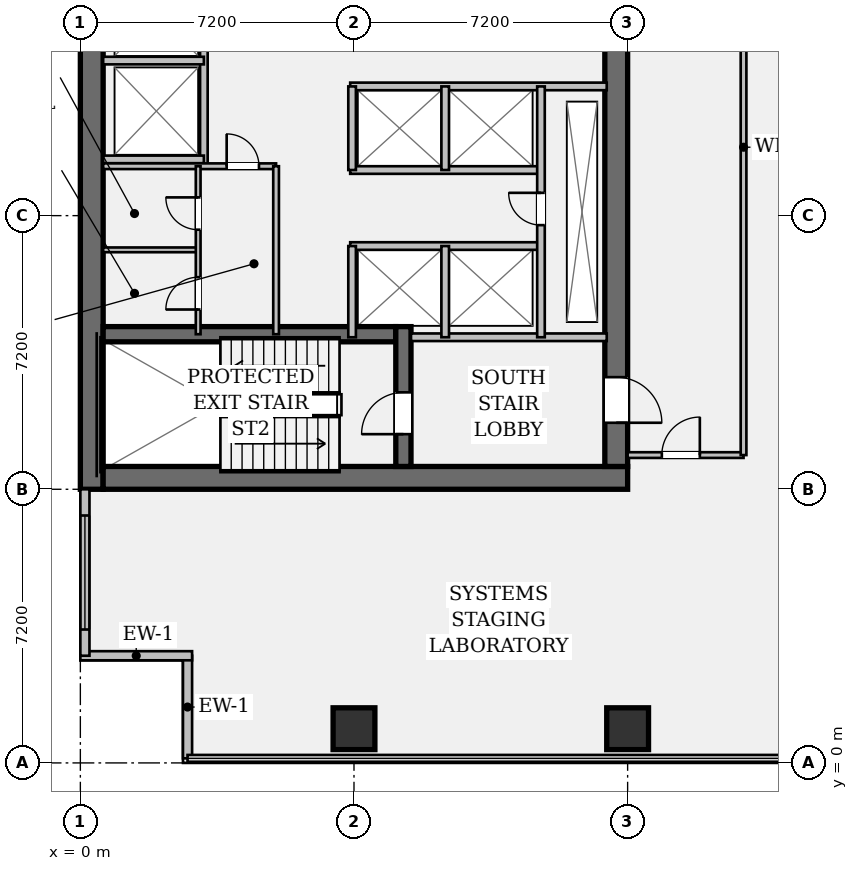
"""IFC4 building model, lengths in metres.
Left out: names, types, materials, properties, quantities, classifications, styles, units other than length and angle.
Written with IfcOpenShell. Run it as: python <this file> out.ifc"""

import sys

from ifc_helpers import new_model, si_unit, direction, frame, frame_2d, origin, origin_2d, place, context, subcontext, project, spatial, rectangle, hollow_rectangle, extrude, element, fill, save


model = new_model("IFC4")
c1 = context("Model", 3, precision=1e-05, world=origin(), true_north=direction((0.0, 1.0)))
c2 = subcontext(c1, "Body", "Model", "MODEL_VIEW")
j1 = project(units=[si_unit("LENGTHUNIT", "METRE"), si_unit("PLANEANGLEUNIT", "RADIAN")], contexts=[c1])
p1 = place(None, origin())
s1 = spatial("IfcSite", under=j1, at=p1, CompositionType="ELEMENT")
p2 = place(p1, origin())
s2 = spatial("IfcBuilding", under=s1, at=p2, CompositionType="ELEMENT")
p3 = place(p2, frame((0.0, 0.0, 22.05)))
s3 = spatial("IfcBuildingStorey", under=s2, at=p3, CompositionType="ELEMENT", Elevation=22.05)
p4 = place(p3, frame((0.3, 7.2, 0.0), z_axis=(0.0, 0.0, 1.0), x_axis=(0.0, 1.0, 0.0)))
e1 = element("IfcWall", 1, at=p4, inside=s3, PredefinedType="SHEAR", context=c2, shape_type="SweptSolid", body=[
    extrude(rectangle(XDim=28.8, YDim=0.6, at=frame_2d((14.4, 0.0))), origin(), (0.0, 0.0, 1.0), 3.9),
])
p5 = place(p3, frame((0.6, 7.5, 0.0), z_axis=(0.0, 0.0, 1.0), x_axis=(1.0, 0.0, 0.0)))
e2 = element("IfcWall", 2, at=p5, inside=s3, PredefinedType="SHEAR", context=c2, shape_type="SweptSolid", body=[
    extrude(rectangle(XDim=13.8, YDim=0.6, at=frame_2d((6.9, 0.0))), origin(), (0.0, 0.0, 1.0), 3.9),
])
p6 = place(p3, frame((14.1, 35.4, 0.0), z_axis=(0.0, 0.0, 1.0), x_axis=(0.0, -1.0, 0.0)))
e3 = element("IfcWall", 3, at=p6, inside=s3, PredefinedType="SHEAR", context=c2, shape_type="SweptSolid", body=[
    extrude(rectangle(XDim=27.6, YDim=0.6, at=frame_2d((13.8, 0.0))), origin(), (0.0, 0.0, 1.0), 3.9),
])
p7 = place(p6, frame((1.3, 0.0, 0.0)))
e4 = element("IfcOpeningElement", 4, at=p7, cuts=e3, PredefinedType="OPENING", context=c2, shape_type="SweptSolid", body=[
    extrude(rectangle(XDim=1.2, YDim=2.15, at=frame_2d((0.6, 1.075))), frame((0.0, 0.312, 0.0), z_axis=(0.0, -1.0, 0.0), x_axis=(1.0, 0.0, 0.0)), (0.0, 0.0, 1.0), 0.624),
])
p8 = place(p6, frame((25.25, 0.0, 0.0)))
e5 = element("IfcOpeningElement", 5, at=p8, cuts=e3, PredefinedType="OPENING", context=c2, shape_type="SweptSolid", body=[
    extrude(rectangle(XDim=1.2, YDim=2.15, at=frame_2d((0.6, 1.075))), frame((0.0, 0.312, 0.0), z_axis=(0.0, -1.0, 0.0), x_axis=(1.0, 0.0, 0.0)), (0.0, 0.0, 1.0), 0.624),
])
p9 = place(p6, frame((14.6, 0.0, 0.0)))
e6 = element("IfcOpeningElement", 6, at=p9, cuts=e3, PredefinedType="OPENING", context=c2, shape_type="SweptSolid", body=[
    extrude(rectangle(XDim=1.6, YDim=2.2, at=frame_2d((0.8, 1.1))), frame((0.0, 0.312, 0.0), z_axis=(0.0, -1.0, 0.0), x_axis=(1.0, 0.0, 0.0)), (0.0, 0.0, 1.0), 0.624),
])
p10 = place(p3, frame((0.6, 11.28, 0.0), z_axis=(0.0, 0.0, 1.0), x_axis=(1.0, 0.0, 0.0)))
e7 = element("IfcWall", 7, at=p10, inside=s3, PredefinedType="SHEAR", context=c2, shape_type="SweptSolid", body=[
    extrude(rectangle(XDim=7.7, YDim=0.4, at=frame_2d((3.85, 0.0))), origin(), (0.0, 0.0, 1.0), 3.9),
])
p11 = place(p3, frame((8.5, 7.8, 0.0), z_axis=(0.0, 0.0, 1.0), x_axis=(0.0, 1.0, 0.0)))
e8 = element("IfcWall", 8, at=p11, inside=s3, PredefinedType="SHEAR", context=c2, shape_type="SweptSolid", body=[
    extrude(rectangle(XDim=3.68, YDim=0.4, at=frame_2d((1.84, 0.0))), origin(), (0.0, 0.0, 1.0), 3.9),
])
p12 = place(p11, frame((0.85, 0.0, 0.0)))
e9 = element("IfcOpeningElement", 9, at=p12, cuts=e8, PredefinedType="OPENING", context=c2, shape_type="SweptSolid", body=[
    extrude(rectangle(XDim=1.1, YDim=2.15, at=frame_2d((0.55, 1.075))), frame((0.0, 0.212, 0.0), z_axis=(0.0, -1.0, 0.0), x_axis=(1.0, 0.0, 0.0)), (0.0, 0.0, 1.0), 0.424),
])
for number, where, z_axis, x_axis in (
    (10, (7.2, 0.9, 0.0), (0.0, 0.0, 1.0), (1.0, 0.0, 0.0)),
    (11, (14.4, 0.9, 0.0), (0.0, 0.0, 1.0), (1.0, 0.0, 0.0)),
):
    element("IfcColumn", number, at=place(p3, frame(where, z_axis=z_axis, x_axis=x_axis)), inside=s3, PredefinedType="COLUMN", context=c2, shape_type="SweptSolid", body=[
        extrude(hollow_rectangle(XDim=1.1, YDim=1.1, WallThickness=0.07, at=origin_2d()), origin(), (0.0, 0.0, 1.0), 3.9),
    ])
p13 = place(p3, frame((2.82, 0.12, 0.0), z_axis=(0.0, 0.0, 1.0), x_axis=(0.0, 1.0, 0.0)))
e12 = element("IfcWall", 12, at=p13, inside=s3, PredefinedType="STANDARD", context=c2, shape_type="SweptSolid", body=[
    extrude(rectangle(XDim=2.7, YDim=0.24, at=frame_2d((1.35, 0.0))), origin(), (0.0, 0.0, 1.0), 3.9),
])
p14 = place(p3, frame((2.94, 2.82, 0.0), z_axis=(0.0, 0.0, 1.0), x_axis=(-1.0, 0.0, 0.0)))
e13 = element("IfcWall", 13, at=p14, inside=s3, PredefinedType="STANDARD", context=c2, shape_type="SweptSolid", body=[
    extrude(rectangle(XDim=2.94, YDim=0.24, at=frame_2d((1.47, 0.0))), origin(), (0.0, 0.0, 1.0), 3.9),
])
p15 = place(p3, frame((0.12, 2.82, 0.0), z_axis=(0.0, 0.0, 1.0), x_axis=(0.0, 1.0, 0.0)))
e14 = element("IfcWall", 14, at=p15, inside=s3, PredefinedType="STANDARD", context=c2, shape_type="SweptSolid", body=[
    extrude(rectangle(XDim=4.38, YDim=0.24, at=frame_2d((2.19, 0.0))), origin(), (0.0, 0.0, 1.0), 3.9),
])
p16 = place(p15, frame((0.69, 0.0, 0.95)))
e15 = element("IfcOpeningElement", 15, at=p16, cuts=e14, PredefinedType="OPENING", context=c2, shape_type="SweptSolid", body=[
    extrude(rectangle(XDim=3.0, YDim=1.5, at=frame_2d((1.5, 0.75))), frame((0.0, 0.132, 0.0), z_axis=(0.0, -1.0, 0.0), x_axis=(1.0, 0.0, 0.0)), (0.0, 0.0, 1.0), 0.264),
])
p17 = place(p3, frame((8.7, 11.2, 0.0), z_axis=(0.0, 0.0, 1.0), x_axis=(1.0, 0.0, 0.0)))
e16 = element("IfcWall", 16, at=p17, inside=s3, PredefinedType="PARTITIONING", context=c2, shape_type="SweptSolid", body=[
    extrude(rectangle(XDim=5.15, YDim=0.2, at=frame_2d((2.575, 0.0))), origin(), (0.0, 0.0, 1.0), 3.9),
])
p18 = place(p3, frame((3.25, 15.7, 0.0), z_axis=(0.0, 0.0, 1.0), x_axis=(0.0, 1.0, 0.0)))
e17 = element("IfcWall", 17, at=p18, inside=s3, PredefinedType="PARTITIONING", context=c2, shape_type="SweptSolid", body=[
    extrude(rectangle(XDim=13.08, YDim=0.2, at=frame_2d((6.54, 0.0))), origin(), (0.0, 0.0, 1.0), 3.9),
])
for number, where, z_axis, x_axis in (
    (18, (0.6, 15.88, 0.0), (0.0, 0.0, 1.0), (1.0, 0.0, 0.0)),
    (19, (0.6, 18.48, 0.0), (0.0, 0.0, 1.0), (1.0, 0.0, 0.0)),
):
    element("IfcWall", number, at=place(p3, frame(where, z_axis=z_axis, x_axis=x_axis)), inside=s3, PredefinedType="PARTITIONING", context=c2, shape_type="SweptSolid", body=[
        extrude(rectangle(XDim=2.65, YDim=0.2, at=frame_2d((1.325, 0.0))), origin(), (0.0, 0.0, 1.0), 3.9),
    ])
p19 = place(p3, frame((7.1, 17.8, 0.0), z_axis=(0.0, 0.0, 1.0), x_axis=(1.0, 0.0, 0.0)))
e20 = element("IfcWall", 20, at=p19, inside=s3, PredefinedType="PARTITIONING", context=c2, shape_type="SweptSolid", body=[
    extrude(rectangle(XDim=6.75, YDim=0.2, at=frame_2d((3.375, 0.0))), origin(), (0.0, 0.0, 1.0), 3.9),
])
for number, where, z_axis, x_axis in (
    (21, (7.1, 15.6, 0.0), (0.0, 0.0, 1.0), (1.0, 0.0, 0.0)),
    (22, (7.1, 13.6, 0.0), (0.0, 0.0, 1.0), (1.0, 0.0, 0.0)),
):
    element("IfcWall", number, at=place(p3, frame(where, z_axis=z_axis, x_axis=x_axis)), inside=s3, PredefinedType="PARTITIONING", context=c2, shape_type="SweptSolid", body=[
        extrude(rectangle(XDim=5.02, YDim=0.2, at=frame_2d((2.51, 0.0))), origin(), (0.0, 0.0, 1.0), 3.9),
    ])
p20 = place(p3, frame((7.15, 15.6, 0.0), z_axis=(0.0, 0.0, 1.0), x_axis=(0.0, 1.0, 0.0)))
e23 = element("IfcWall", 23, at=p20, inside=s3, PredefinedType="PARTITIONING", context=c2, shape_type="SweptSolid", body=[
    extrude(rectangle(XDim=2.2, YDim=0.2, at=frame_2d((1.1, 0.0))), origin(), (0.0, 0.0, 1.0), 3.9),
])
p21 = place(p3, frame((7.15, 11.2, 0.0), z_axis=(0.0, 0.0, 1.0), x_axis=(0.0, 1.0, 0.0)))
e24 = element("IfcWall", 24, at=p21, inside=s3, PredefinedType="PARTITIONING", context=c2, shape_type="SweptSolid", body=[
    extrude(rectangle(XDim=2.4, YDim=0.2, at=frame_2d((1.2, 0.0))), origin(), (0.0, 0.0, 1.0), 3.9),
])
p22 = place(p3, frame((9.6, 15.6, 0.0), z_axis=(0.0, 0.0, 1.0), x_axis=(0.0, 1.0, 0.0)))
e25 = element("IfcWall", 25, at=p22, inside=s3, PredefinedType="PARTITIONING", context=c2, shape_type="SweptSolid", body=[
    extrude(rectangle(XDim=2.2, YDim=0.2, at=frame_2d((1.1, 0.0))), origin(), (0.0, 0.0, 1.0), 3.9),
])
p23 = place(p3, frame((9.6, 11.2, 0.0), z_axis=(0.0, 0.0, 1.0), x_axis=(0.0, 1.0, 0.0)))
e26 = element("IfcWall", 26, at=p23, inside=s3, PredefinedType="PARTITIONING", context=c2, shape_type="SweptSolid", body=[
    extrude(rectangle(XDim=2.4, YDim=0.2, at=frame_2d((1.2, 0.0))), origin(), (0.0, 0.0, 1.0), 3.9),
])
p24 = place(p3, frame((12.12, 11.2, 0.0), z_axis=(0.0, 0.0, 1.0), x_axis=(0.0, 1.0, 0.0)))
e27 = element("IfcWall", 27, at=p24, inside=s3, PredefinedType="PARTITIONING", context=c2, shape_type="SweptSolid", body=[
    extrude(rectangle(XDim=6.6, YDim=0.2, at=frame_2d((3.3, 0.0))), origin(), (0.0, 0.0, 1.0), 3.9),
])
p25 = place(p24, frame((2.95, 0.0, 0.0)))
e28 = element("IfcOpeningElement", 28, at=p25, cuts=e27, PredefinedType="OPENING", context=c2, shape_type="SweptSolid", body=[
    extrude(rectangle(XDim=0.85, YDim=2.15, at=frame_2d((0.425, 1.075))), frame((0.0, 0.112, 0.0), z_axis=(0.0, -1.0, 0.0), x_axis=(1.0, 0.0, 0.0)), (0.0, 0.0, 1.0), 0.224),
])
p26 = place(p3, frame((0.6, 15.7, 0.0), z_axis=(0.0, 0.0, 1.0), x_axis=(1.0, 0.0, 0.0)))
e29 = element("IfcWall", 29, at=p26, inside=s3, PredefinedType="PARTITIONING", context=c2, shape_type="SweptSolid", body=[
    extrude(rectangle(XDim=4.55, YDim=0.15, at=frame_2d((2.275, 0.0))), origin(), (0.0, 0.0, 1.0), 3.9),
])
p27 = place(p26, frame((3.25, 0.0, 0.0)))
e30 = element("IfcOpeningElement", 30, at=p27, cuts=e29, PredefinedType="OPENING", context=c2, shape_type="SweptSolid", body=[
    extrude(rectangle(XDim=0.85, YDim=2.15, at=frame_2d((0.425, 1.075))), frame((0.0, 0.087, 0.0), z_axis=(0.0, -1.0, 0.0), x_axis=(1.0, 0.0, 0.0)), (0.0, 0.0, 1.0), 0.174),
])
p28 = place(p3, frame((5.15, 11.28, 0.0), z_axis=(0.0, 0.0, 1.0), x_axis=(0.0, 1.0, 0.0)))
e31 = element("IfcWall", 31, at=p28, inside=s3, PredefinedType="PARTITIONING", context=c2, shape_type="SweptSolid", body=[
    extrude(rectangle(XDim=4.42, YDim=0.15, at=frame_2d((2.21, 0.0))), origin(), (0.0, 0.0, 1.0), 3.9),
])
p29 = place(p3, frame((0.6, 13.5, 0.0), z_axis=(0.0, 0.0, 1.0), x_axis=(1.0, 0.0, 0.0)))
e32 = element("IfcWall", 32, at=p29, inside=s3, PredefinedType="PARTITIONING", context=c2, shape_type="SweptSolid", body=[
    extrude(rectangle(XDim=2.5, YDim=0.125, at=frame_2d((1.25, 0.0))), origin(), (0.0, 0.0, 1.0), 3.9),
])
p30 = place(p3, frame((3.1, 11.28, 0.0), z_axis=(0.0, 0.0, 1.0), x_axis=(0.0, 1.0, 0.0)))
e33 = element("IfcWall", 33, at=p30, inside=s3, PredefinedType="PARTITIONING", context=c2, shape_type="SweptSolid", body=[
    extrude(rectangle(XDim=4.42, YDim=0.125, at=frame_2d((2.21, 0.0))), origin(), (0.0, 0.0, 1.0), 3.9),
])
p31 = place(p30, frame((0.65, 0.0, 0.0)))
e34 = element("IfcOpeningElement", 34, at=p31, cuts=e33, PredefinedType="OPENING", context=c2, shape_type="SweptSolid", body=[
    extrude(rectangle(XDim=0.85, YDim=2.15, at=frame_2d((0.425, 1.075))), frame((0.0, 0.074, 0.0), z_axis=(0.0, -1.0, 0.0), x_axis=(1.0, 0.0, 0.0)), (0.0, 0.0, 1.0), 0.149),
])
p32 = place(p30, frame((2.75, 0.0, 0.0)))
e35 = element("IfcOpeningElement", 35, at=p32, cuts=e33, PredefinedType="OPENING", context=c2, shape_type="SweptSolid", body=[
    extrude(rectangle(XDim=0.85, YDim=2.15, at=frame_2d((0.425, 1.075))), frame((0.0, 0.074, 0.0), z_axis=(0.0, -1.0, 0.0), x_axis=(1.0, 0.0, 0.0)), (0.0, 0.0, 1.0), 0.149),
])
p33 = place(p3, frame((14.4, 8.1, 0.0), z_axis=(0.0, 0.0, 1.0), x_axis=(1.0, 0.0, 0.0)))
e36 = element("IfcWall", 36, at=p33, inside=s3, PredefinedType="PARTITIONING", context=c2, shape_type="SweptSolid", body=[
    extrude(rectangle(XDim=3.05, YDim=0.15, at=frame_2d((1.525, 0.0))), origin(), (0.0, 0.0, 1.0), 2.958),
])
p34 = place(p33, frame((0.9, 0.0, 0.0)))
e37 = element("IfcOpeningElement", 37, at=p34, cuts=e36, PredefinedType="OPENING", context=c2, shape_type="SweptSolid", body=[
    extrude(rectangle(XDim=1.0, YDim=2.15, at=frame_2d((0.5, 1.075))), frame((0.0, 0.087, 0.0), z_axis=(0.0, -1.0, 0.0), x_axis=(1.0, 0.0, 0.0)), (0.0, 0.0, 1.0), 0.174),
])
p35 = place(p3, frame((17.45, 8.1, 0.0), z_axis=(0.0, 0.0, 1.0), x_axis=(0.0, 1.0, 0.0)))
e38 = element("IfcWall", 38, at=p35, inside=s3, PredefinedType="PARTITIONING", context=c2, shape_type="SweptSolid", body=[
    extrude(rectangle(XDim=16.2, YDim=0.15, at=frame_2d((8.1, 0.0))), origin(), (0.0, 0.0, 1.0), 2.958),
])
p36 = place(p16, origin())
e39 = element("IfcWindow", 39, at=p36, inside=s3, PartitioningType="SINGLE_PANEL", PredefinedType="WINDOW", context=c2, shape_type="SweptSolid", body=[
    extrude(rectangle(XDim=3.0, YDim=1.5, at=frame_2d((1.5, 0.75))), frame((0.0, 0.03, 0.0), z_axis=(0.0, -1.0, 0.0), x_axis=(1.0, 0.0, 0.0)), (0.0, 0.0, 1.0), 0.06),
])
fill(e15, e39)
p37 = place(p12, origin())
e40 = element("IfcDoor", 40, at=p37, inside=s3, OperationType="SINGLE_SWING_LEFT", PredefinedType="DOOR", context=c2, shape_type="SweptSolid", body=[
    extrude(rectangle(XDim=1.1, YDim=2.15, at=frame_2d((0.55, 1.075))), frame((0.0, 0.025, 0.0), z_axis=(0.0, -1.0, 0.0), x_axis=(1.0, 0.0, 0.0)), (0.0, 0.0, 1.0), 0.05),
])
fill(e9, e40)
p38 = place(p8, origin())
e41 = element("IfcDoor", 41, at=p38, inside=s3, OperationType="SINGLE_SWING_RIGHT", PredefinedType="DOOR", context=c2, shape_type="SweptSolid", body=[
    extrude(rectangle(XDim=1.2, YDim=2.15, at=frame_2d((0.6, 1.075))), frame((0.0, 0.025, 0.0), z_axis=(0.0, -1.0, 0.0), x_axis=(1.0, 0.0, 0.0)), (0.0, 0.0, 1.0), 0.05),
])
fill(e5, e41)
p39 = place(p25, origin())
e42 = element("IfcDoor", 42, at=p39, inside=s3, OperationType="SINGLE_SWING_RIGHT", PredefinedType="DOOR", context=c2, shape_type="SweptSolid", body=[
    extrude(rectangle(XDim=0.85, YDim=2.15, at=frame_2d((0.425, 1.075))), frame((0.0, 0.025, 0.0), z_axis=(0.0, -1.0, 0.0), x_axis=(1.0, 0.0, 0.0)), (0.0, 0.0, 1.0), 0.05),
])
fill(e28, e42)
p40 = place(p27, origin())
e43 = element("IfcDoor", 43, at=p40, inside=s3, OperationType="SINGLE_SWING_LEFT", PredefinedType="DOOR", context=c2, shape_type="SweptSolid", body=[
    extrude(rectangle(XDim=0.85, YDim=2.15, at=frame_2d((0.425, 1.075))), frame((0.0, 0.025, 0.0), z_axis=(0.0, -1.0, 0.0), x_axis=(1.0, 0.0, 0.0)), (0.0, 0.0, 1.0), 0.05),
])
fill(e30, e43)
p41 = place(p31, origin())
e44 = element("IfcDoor", 44, at=p41, inside=s3, OperationType="SINGLE_SWING_LEFT", PredefinedType="DOOR", context=c2, shape_type="SweptSolid", body=[
    extrude(rectangle(XDim=0.85, YDim=2.15, at=frame_2d((0.425, 1.075))), frame((0.0, 0.025, 0.0), z_axis=(0.0, -1.0, 0.0), x_axis=(1.0, 0.0, 0.0)), (0.0, 0.0, 1.0), 0.05),
])
fill(e34, e44)
p42 = place(p32, origin())
e45 = element("IfcDoor", 45, at=p42, inside=s3, OperationType="SINGLE_SWING_RIGHT", PredefinedType="DOOR", context=c2, shape_type="SweptSolid", body=[
    extrude(rectangle(XDim=0.85, YDim=2.15, at=frame_2d((0.425, 1.075))), frame((0.0, 0.025, 0.0), z_axis=(0.0, -1.0, 0.0), x_axis=(1.0, 0.0, 0.0)), (0.0, 0.0, 1.0), 0.05),
])
fill(e35, e45)
p43 = place(p34, origin())
e46 = element("IfcDoor", 46, at=p43, inside=s3, OperationType="SINGLE_SWING_RIGHT", PredefinedType="DOOR", context=c2, shape_type="SweptSolid", body=[
    extrude(rectangle(XDim=1.0, YDim=2.15, at=frame_2d((0.5, 1.075))), frame((0.0, 0.025, 0.0), z_axis=(0.0, -1.0, 0.0), x_axis=(1.0, 0.0, 0.0)), (0.0, 0.0, 1.0), 0.05),
])
fill(e37, e46)
save(model, sys.argv[1])
